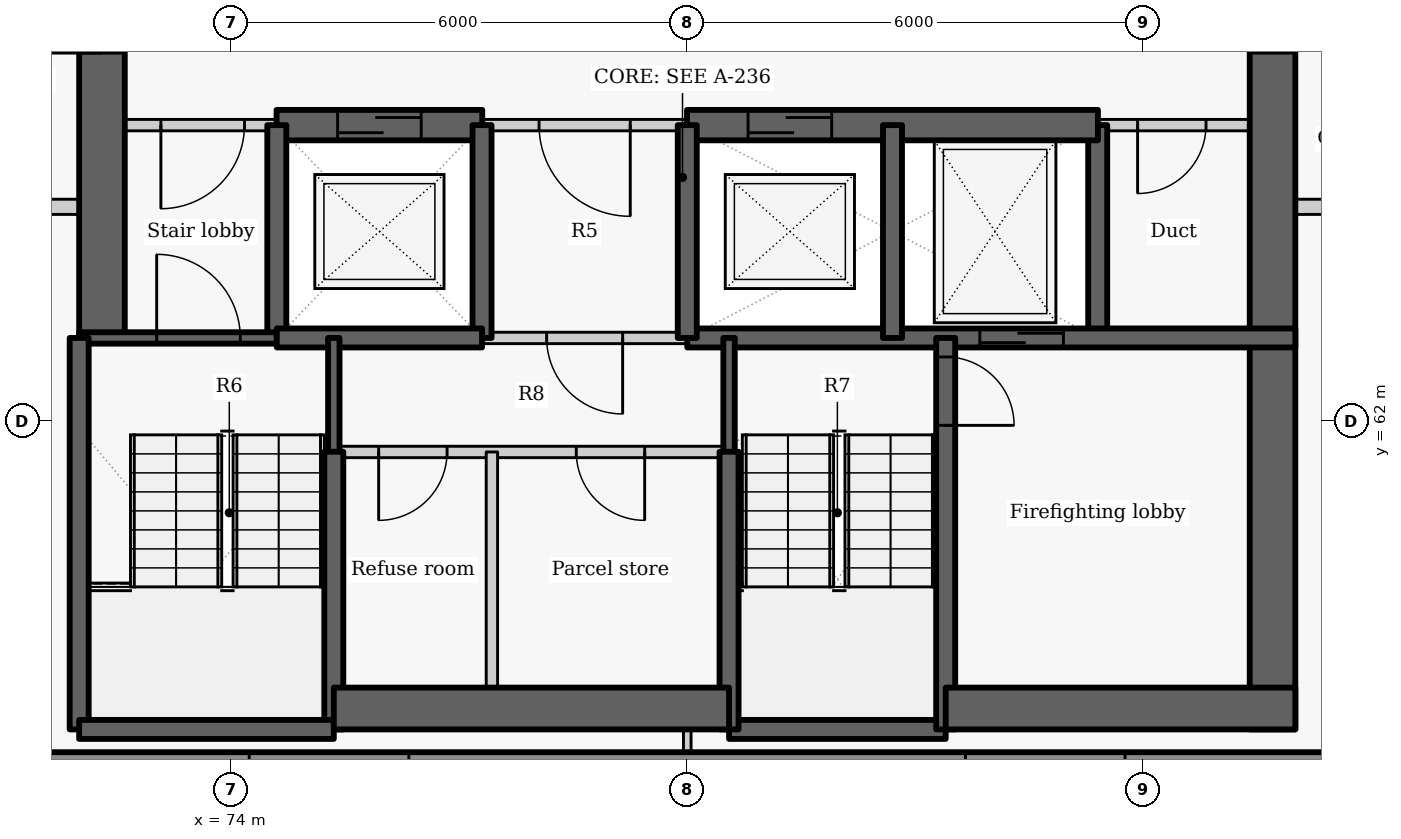
"""IFC4 building model, lengths in metres.
Left out: names, types, materials, properties, quantities, classifications, styles, units other than length and angle.
Written with IfcOpenShell. Run it as: python <this file> out.ifc"""

import sys

from ifc_helpers import new_model, si_unit, direction, frame, frame_2d, origin, place, context, subcontext, project, spatial, rectangle, extrude, element, fill, save


model = new_model("IFC4")
c1 = context("Model", 3, precision=1e-05, world=origin(), true_north=direction((0.0, 1.0)))
c2 = subcontext(c1, "Body", "Model", "MODEL_VIEW")
j1 = project(units=[si_unit("LENGTHUNIT", "METRE"), si_unit("PLANEANGLEUNIT", "RADIAN")], contexts=[c1])
p1 = place(None, origin())
s1 = spatial("IfcSite", under=j1, at=p1, CompositionType="ELEMENT")
p2 = place(p1, origin())
s2 = spatial("IfcBuilding", under=s1, at=p2, CompositionType="ELEMENT")
p3 = place(p2, frame((0.0, 0.0, 213.0)))
s3 = spatial("IfcBuildingStorey", under=s2, at=p3, CompositionType="ELEMENT", Elevation=213.0)
p4 = place(p3, frame((70.551, 57.5, 0.0), z_axis=(0.0, 0.0, 1.0), x_axis=(1.0, 0.0, 0.0)))
e1 = element("IfcWall", 1, at=p4, inside=s3, PredefinedType="SOLIDWALL", context=c2, shape_type="SweptSolid", body=[
    extrude(rectangle(XDim=18.893, YDim=0.3, at=frame_2d((9.446, 0.0))), origin(), (0.0, 0.0, 1.0), 2.425),
])
p5 = place(p4, frame((3.687, 0.0, 0.9)))
e2 = element("IfcOpeningElement", 2, at=p5, cuts=e1, PredefinedType="OPENING", context=c2, shape_type="SweptSolid", body=[
    extrude(rectangle(XDim=2.1, YDim=1.1, at=frame_2d((1.05, 0.55))), frame((0.0, 0.16, 0.0), z_axis=(0.0, -1.0, 0.0), x_axis=(1.0, 0.0, 0.0)), (0.0, 0.0, 1.0), 0.32),
])
p6 = place(p4, frame((13.109, 0.0, 0.9)))
e3 = element("IfcOpeningElement", 3, at=p6, cuts=e1, PredefinedType="OPENING", context=c2, shape_type="SweptSolid", body=[
    extrude(rectangle(XDim=2.1, YDim=1.1, at=frame_2d((1.05, 0.55))), frame((0.0, 0.16, 0.0), z_axis=(0.0, -1.0, 0.0), x_axis=(1.0, 0.0, 0.0)), (0.0, 0.0, 1.0), 0.32),
])
p7 = place(p3, frame((72.3, 63.1, -0.275), z_axis=(0.0, 0.0, 1.0), x_axis=(0.0, 1.0, 0.0)))
e4 = element("IfcWall", 4, at=p7, inside=s3, PredefinedType="SHEAR", context=c2, shape_type="SweptSolid", body=[
    extrude(rectangle(XDim=9.1, YDim=0.6, at=frame_2d((4.55, 0.0))), origin(), (0.0, 0.0, 1.0), 3.3),
])
p8 = place(p7, frame((3.748, 0.0, 0.275)))
e5 = element("IfcOpeningElement", 5, at=p8, cuts=e4, PredefinedType="OPENING", context=c2, shape_type="SweptSolid", body=[
    extrude(rectangle(XDim=1.5, YDim=2.1, at=frame_2d((0.75, 1.05))), frame((0.0, 0.31, 0.0), z_axis=(0.0, -1.0, 0.0), x_axis=(1.0, 0.0, 0.0)), (0.0, 0.0, 1.0), 0.62),
])
p9 = place(p3, frame((85.4, 63.1, -0.275), z_axis=(0.0, 0.0, 1.0), x_axis=(0.0, 1.0, 0.0)))
e6 = element("IfcWall", 6, at=p9, inside=s3, PredefinedType="SHEAR", context=c2, shape_type="SweptSolid", body=[
    extrude(rectangle(XDim=2.8, YDim=0.25, at=frame_2d((1.4, 0.0))), origin(), (0.0, 0.0, 1.0), 3.3),
])
p10 = place(p3, frame((87.7, 72.2, -0.275), z_axis=(0.0, 0.0, 1.0), x_axis=(0.0, -1.0, 0.0)))
e7 = element("IfcWall", 7, at=p10, inside=s3, PredefinedType="SHEAR", context=c2, shape_type="SweptSolid", body=[
    extrude(rectangle(XDim=14.25, YDim=0.6, at=frame_2d((7.125, 0.0))), origin(), (0.0, 0.0, 1.0), 3.3),
])
p11 = place(p10, frame((3.852, 0.0, 0.275)))
e8 = element("IfcOpeningElement", 8, at=p11, cuts=e7, PredefinedType="OPENING", context=c2, shape_type="SweptSolid", body=[
    extrude(rectangle(XDim=1.5, YDim=2.1, at=frame_2d((0.75, 1.05))), frame((0.0, 0.31, 0.0), z_axis=(0.0, -1.0, 0.0), x_axis=(1.0, 0.0, 0.0)), (0.0, 0.0, 1.0), 0.62),
])
p12 = place(p3, frame((74.603, 65.9, 0.0), z_axis=(0.0, 0.0, 1.0), x_axis=(-1.0, 0.0, 0.0)))
e9 = element("IfcWall", 9, at=p12, inside=s3, PredefinedType="PARTITIONING", context=c2, shape_type="SweptSolid", body=[
    extrude(rectangle(XDim=2.603, YDim=0.15, at=frame_2d((1.302, 0.0))), origin(), (0.0, 0.0, 1.0), 3.025),
])
p13 = place(p12, frame((0.428, 0.0, 0.0)))
e10 = element("IfcOpeningElement", 10, at=p13, cuts=e9, PredefinedType="OPENING", context=c2, shape_type="SweptSolid", body=[
    extrude(rectangle(XDim=1.1, YDim=2.1, at=frame_2d((0.55, 1.05))), frame((0.0, 0.085, 0.0), z_axis=(0.0, -1.0, 0.0), x_axis=(1.0, 0.0, 0.0)), (0.0, 0.0, 1.0), 0.17),
])
p14 = place(p3, frame((80.003, 65.9, 0.0), z_axis=(0.0, 0.0, 1.0), x_axis=(-1.0, 0.0, 0.0)))
e11 = element("IfcWall", 11, at=p14, inside=s3, PredefinedType="PARTITIONING", context=c2, shape_type="SweptSolid", body=[
    extrude(rectangle(XDim=2.706, YDim=0.15, at=frame_2d((1.353, 0.0))), origin(), (0.0, 0.0, 1.0), 3.025),
])
p15 = place(p14, frame((0.753, 0.0, 0.0)))
e12 = element("IfcOpeningElement", 12, at=p15, cuts=e11, PredefinedType="OPENING", context=c2, shape_type="SweptSolid", body=[
    extrude(rectangle(XDim=1.2, YDim=2.1, at=frame_2d((0.6, 1.05))), frame((0.0, 0.085, 0.0), z_axis=(0.0, -1.0, 0.0), x_axis=(1.0, 0.0, 0.0)), (0.0, 0.0, 1.0), 0.17),
])
p16 = place(p3, frame((88.0, 65.9, 0.0), z_axis=(0.0, 0.0, 1.0), x_axis=(-1.0, 0.0, 0.0)))
e13 = element("IfcWall", 13, at=p16, inside=s3, PredefinedType="PARTITIONING", context=c2, shape_type="SweptSolid", body=[
    extrude(rectangle(XDim=2.603, YDim=0.15, at=frame_2d((1.302, 0.0))), origin(), (0.0, 0.0, 1.0), 3.025),
])
p17 = place(p16, frame((1.175, 0.0, 0.0)))
e14 = element("IfcOpeningElement", 14, at=p17, cuts=e13, PredefinedType="OPENING", context=c2, shape_type="SweptSolid", body=[
    extrude(rectangle(XDim=0.9, YDim=2.1, at=frame_2d((0.45, 1.05))), frame((0.0, 0.085, 0.0), z_axis=(0.0, -1.0, 0.0), x_axis=(1.0, 0.0, 0.0)), (0.0, 0.0, 1.0), 0.17),
])
p18 = place(p3, frame((74.597, 65.9, -0.275), z_axis=(0.0, 0.0, 1.0), x_axis=(1.0, 0.0, 0.0)))
e15 = element("IfcWall", 15, at=p18, inside=s3, PredefinedType="SHEAR", context=c2, shape_type="SweptSolid", body=[
    extrude(rectangle(XDim=2.706, YDim=0.4, at=frame_2d((1.353, 0.0))), origin(), (0.0, 0.0, 1.0), 3.3),
])
p19 = place(p18, frame((0.803, 0.0, 0.275)))
e16 = element("IfcOpeningElement", 16, at=p19, cuts=e15, PredefinedType="OPENING", context=c2, shape_type="SweptSolid", body=[
    extrude(rectangle(XDim=1.1, YDim=2.1, at=frame_2d((0.55, 1.05))), frame((0.0, 0.21, 0.0), z_axis=(0.0, -1.0, 0.0), x_axis=(1.0, 0.0, 0.0)), (0.0, 0.0, 1.0), 0.42),
])
p20 = place(p3, frame((79.997, 65.9, -0.275), z_axis=(0.0, 0.0, 1.0), x_axis=(1.0, 0.0, 0.0)))
e17 = element("IfcWall", 17, at=p20, inside=s3, PredefinedType="SHEAR", context=c2, shape_type="SweptSolid", body=[
    extrude(rectangle(XDim=5.406, YDim=0.4, at=frame_2d((2.703, 0.0))), origin(), (0.0, 0.0, 1.0), 3.3),
])
p21 = place(p20, frame((0.803, 0.0, 0.275)))
e18 = element("IfcOpeningElement", 18, at=p21, cuts=e17, PredefinedType="OPENING", context=c2, shape_type="SweptSolid", body=[
    extrude(rectangle(XDim=1.1, YDim=2.1, at=frame_2d((0.55, 1.05))), frame((0.0, 0.21, 0.0), z_axis=(0.0, -1.0, 0.0), x_axis=(1.0, 0.0, 0.0)), (0.0, 0.0, 1.0), 0.42),
])
p22 = place(p3, frame((74.6, 63.1, -0.275), z_axis=(0.0, 0.0, 1.0), x_axis=(0.0, 1.0, 0.0)))
e19 = element("IfcWall", 19, at=p22, inside=s3, PredefinedType="SHEAR", context=c2, shape_type="SweptSolid", body=[
    extrude(rectangle(XDim=2.8, YDim=0.25, at=frame_2d((1.4, 0.0))), origin(), (0.0, 0.0, 1.0), 3.3),
])
p23 = place(p3, frame((72.0, 63.1, -0.275), z_axis=(0.0, 0.0, 1.0), x_axis=(1.0, 0.0, 0.0)))
e20 = element("IfcWall", 20, at=p23, inside=s3, PredefinedType="SHEAR", context=c2, shape_type="SweptSolid", body=[
    extrude(rectangle(XDim=2.6, YDim=0.15, at=frame_2d((1.3, 0.0))), origin(), (0.0, 0.0, 1.0), 3.3),
])
p24 = place(p23, frame((1.02, 0.0, 0.275)))
e21 = element("IfcOpeningElement", 21, at=p24, cuts=e20, PredefinedType="OPENING", context=c2, shape_type="SweptSolid", body=[
    extrude(rectangle(XDim=1.1, YDim=2.1, at=frame_2d((0.55, 1.05))), frame((0.0, 0.085, 0.0), z_axis=(0.0, -1.0, 0.0), x_axis=(1.0, 0.0, 0.0)), (0.0, 0.0, 1.0), 0.17),
])
p25 = place(p3, frame((77.3, 63.1, -0.275), z_axis=(0.0, 0.0, 1.0), x_axis=(0.0, 1.0, 0.0)))
e22 = element("IfcWall", 22, at=p25, inside=s3, PredefinedType="SHEAR", context=c2, shape_type="SweptSolid", body=[
    extrude(rectangle(XDim=2.8, YDim=0.25, at=frame_2d((1.4, 0.0))), origin(), (0.0, 0.0, 1.0), 3.3),
])
p26 = place(p3, frame((74.6, 63.1, -0.275), z_axis=(0.0, 0.0, 1.0), x_axis=(1.0, 0.0, 0.0)))
e23 = element("IfcWall", 23, at=p26, inside=s3, PredefinedType="SHEAR", context=c2, shape_type="SweptSolid", body=[
    extrude(rectangle(XDim=2.7, YDim=0.25, at=frame_2d((1.35, 0.0))), origin(), (0.0, 0.0, 1.0), 3.3),
])
p27 = place(p3, frame((80.0, 63.1, -0.275), z_axis=(0.0, 0.0, 1.0), x_axis=(1.0, 0.0, 0.0)))
e24 = element("IfcWall", 24, at=p27, inside=s3, PredefinedType="SHEAR", context=c2, shape_type="SweptSolid", body=[
    extrude(rectangle(XDim=8.0, YDim=0.25, at=frame_2d((4.0, 0.0))), origin(), (0.0, 0.0, 1.0), 3.3),
])
p28 = place(p27, frame((3.849, 0.0, 0.275)))
e25 = element("IfcOpeningElement", 25, at=p28, cuts=e24, PredefinedType="OPENING", context=c2, shape_type="SweptSolid", body=[
    extrude(rectangle(XDim=1.1, YDim=2.1, at=frame_2d((0.55, 1.05))), frame((0.0, 0.135, 0.0), z_axis=(0.0, -1.0, 0.0), x_axis=(1.0, 0.0, 0.0)), (0.0, 0.0, 1.0), 0.27),
])
p29 = place(p3, frame((80.0, 63.1, -0.275), z_axis=(0.0, 0.0, 1.0), x_axis=(0.0, 1.0, 0.0)))
e26 = element("IfcWall", 26, at=p29, inside=s3, PredefinedType="SHEAR", context=c2, shape_type="SweptSolid", body=[
    extrude(rectangle(XDim=2.8, YDim=0.25, at=frame_2d((1.4, 0.0))), origin(), (0.0, 0.0, 1.0), 3.3),
])
p30 = place(p3, frame((80.0, 63.1, 0.0), z_axis=(0.0, 0.0, 1.0), x_axis=(-1.0, 0.0, 0.0)))
e27 = element("IfcWall", 27, at=p30, inside=s3, PredefinedType="PARTITIONING", context=c2, shape_type="SweptSolid", body=[
    extrude(rectangle(XDim=2.7, YDim=0.15, at=frame_2d((1.35, 0.0))), origin(), (0.0, 0.0, 1.0), 3.025),
])
p31 = place(p30, frame((0.85, 0.0, 0.0)))
e28 = element("IfcOpeningElement", 28, at=p31, cuts=e27, PredefinedType="OPENING", context=c2, shape_type="SweptSolid", body=[
    extrude(rectangle(XDim=1.0, YDim=2.1, at=frame_2d((0.5, 1.05))), frame((0.0, 0.085, 0.0), z_axis=(0.0, -1.0, 0.0), x_axis=(1.0, 0.0, 0.0)), (0.0, 0.0, 1.0), 0.17),
])
p32 = place(p3, frame((82.7, 63.1, -0.275), z_axis=(0.0, 0.0, 1.0), x_axis=(0.0, 1.0, 0.0)))
e29 = element("IfcWall", 29, at=p32, inside=s3, PredefinedType="SHEAR", context=c2, shape_type="SweptSolid", body=[
    extrude(rectangle(XDim=2.8, YDim=0.25, at=frame_2d((1.4, 0.0))), origin(), (0.0, 0.0, 1.0), 3.3),
])
p33 = place(p3, frame((75.35, 61.597, -0.275), z_axis=(0.0, 0.0, 1.0), x_axis=(0.0, 1.0, 0.0)))
e30 = element("IfcWall", 30, at=p33, inside=s3, PredefinedType="SHEAR", context=c2, shape_type="SweptSolid", body=[
    extrude(rectangle(XDim=1.503, YDim=0.15, at=frame_2d((0.751, 0.0))), origin(), (0.0, 0.0, 1.0), 3.3),
])
p34 = place(p3, frame((75.35, 57.95, -0.275), z_axis=(0.0, 0.0, 1.0), x_axis=(0.0, 1.0, 0.0)))
e31 = element("IfcWall", 31, at=p34, inside=s3, PredefinedType="SHEAR", context=c2, shape_type="SweptSolid", body=[
    extrude(rectangle(XDim=3.653, YDim=0.25, at=frame_2d((1.827, 0.0))), origin(), (0.0, 0.0, 1.0), 3.3),
])
p35 = place(p3, frame((72.0, 57.95, -0.275), z_axis=(0.0, 0.0, 1.0), x_axis=(0.0, 1.0, 0.0)))
e32 = element("IfcWall", 32, at=p35, inside=s3, PredefinedType="SHEAR", context=c2, shape_type="SweptSolid", body=[
    extrude(rectangle(XDim=5.15, YDim=0.25, at=frame_2d((2.575, 0.0))), origin(), (0.0, 0.0, 1.0), 3.3),
])
p36 = place(p3, frame((72.0, 57.95, -0.275), z_axis=(0.0, 0.0, 1.0), x_axis=(1.0, 0.0, 0.0)))
e33 = element("IfcWall", 33, at=p36, inside=s3, PredefinedType="SHEAR", context=c2, shape_type="SweptSolid", body=[
    extrude(rectangle(XDim=3.35, YDim=0.25, at=frame_2d((1.675, 0.0))), origin(), (0.0, 0.0, 1.0), 3.3),
])
p37 = place(p3, frame((80.55, 57.95, -0.275), z_axis=(0.0, 0.0, 1.0), x_axis=(1.0, 0.0, 0.0)))
e34 = element("IfcWall", 34, at=p37, inside=s3, PredefinedType="SHEAR", context=c2, shape_type="SweptSolid", body=[
    extrude(rectangle(XDim=2.85, YDim=0.25, at=frame_2d((1.425, 0.0))), origin(), (0.0, 0.0, 1.0), 3.3),
])
p38 = place(p3, frame((83.4, 63.1, -0.275), z_axis=(0.0, 0.0, 1.0), x_axis=(0.0, -1.0, 0.0)))
e35 = element("IfcWall", 35, at=p38, inside=s3, PredefinedType="SHEAR", context=c2, shape_type="SweptSolid", body=[
    extrude(rectangle(XDim=5.15, YDim=0.25, at=frame_2d((2.575, 0.0))), origin(), (0.0, 0.0, 1.0), 3.3),
])
p39 = place(p38, frame((0.25, 0.0, 0.275)))
e36 = element("IfcOpeningElement", 36, at=p39, cuts=e35, PredefinedType="OPENING", context=c2, shape_type="SweptSolid", body=[
    extrude(rectangle(XDim=0.9, YDim=2.1, at=frame_2d((0.45, 1.05))), frame((0.0, 0.135, 0.0), z_axis=(0.0, -1.0, 0.0), x_axis=(1.0, 0.0, 0.0)), (0.0, 0.0, 1.0), 0.27),
])
p40 = place(p3, frame((80.55, 61.597, -0.275), z_axis=(0.0, 0.0, 1.0), x_axis=(0.0, 1.0, 0.0)))
e37 = element("IfcWall", 37, at=p40, inside=s3, PredefinedType="SHEAR", context=c2, shape_type="SweptSolid", body=[
    extrude(rectangle(XDim=1.503, YDim=0.15, at=frame_2d((0.751, 0.0))), origin(), (0.0, 0.0, 1.0), 3.3),
])
p41 = place(p3, frame((80.55, 57.95, -0.275), z_axis=(0.0, 0.0, 1.0), x_axis=(0.0, 1.0, 0.0)))
e38 = element("IfcWall", 38, at=p41, inside=s3, PredefinedType="SHEAR", context=c2, shape_type="SweptSolid", body=[
    extrude(rectangle(XDim=3.653, YDim=0.25, at=frame_2d((1.827, 0.0))), origin(), (0.0, 0.0, 1.0), 3.3),
])
p42 = place(p3, frame((75.35, 58.225, -0.275), z_axis=(0.0, 0.0, 1.0), x_axis=(1.0, 0.0, 0.0)))
e39 = element("IfcWall", 39, at=p42, inside=s3, PredefinedType="SHEAR", context=c2, shape_type="SweptSolid", body=[
    extrude(rectangle(XDim=5.2, YDim=0.55, at=frame_2d((2.6, 0.0))), origin(), (0.0, 0.0, 1.0), 3.3),
])
p43 = place(p3, frame((83.4, 58.225, -0.275), z_axis=(0.0, 0.0, 1.0), x_axis=(1.0, 0.0, 0.0)))
e40 = element("IfcWall", 40, at=p43, inside=s3, PredefinedType="SHEAR", context=c2, shape_type="SweptSolid", body=[
    extrude(rectangle(XDim=4.6, YDim=0.55, at=frame_2d((2.3, 0.0))), origin(), (0.0, 0.0, 1.0), 3.3),
])
p44 = place(p3, frame((80.55, 61.6, 0.0), z_axis=(0.0, 0.0, 1.0), x_axis=(-1.0, 0.0, 0.0)))
e41 = element("IfcWall", 41, at=p44, inside=s3, PredefinedType="PARTITIONING", context=c2, shape_type="SweptSolid", body=[
    extrude(rectangle(XDim=5.2, YDim=0.15, at=frame_2d((2.6, 0.0))), origin(), (0.0, 0.0, 1.0), 3.025),
])
p45 = place(p44, frame((3.71, 0.0, 0.0)))
e42 = element("IfcOpeningElement", 42, at=p45, cuts=e41, PredefinedType="OPENING", context=c2, shape_type="SweptSolid", body=[
    extrude(rectangle(XDim=0.9, YDim=2.1, at=frame_2d((0.45, 1.05))), frame((0.0, 0.085, 0.0), z_axis=(0.0, -1.0, 0.0), x_axis=(1.0, 0.0, 0.0)), (0.0, 0.0, 1.0), 0.17),
])
p46 = place(p44, frame((1.11, 0.0, 0.0)))
e43 = element("IfcOpeningElement", 43, at=p46, cuts=e41, PredefinedType="OPENING", context=c2, shape_type="SweptSolid", body=[
    extrude(rectangle(XDim=0.9, YDim=2.1, at=frame_2d((0.45, 1.05))), frame((0.0, 0.085, 0.0), z_axis=(0.0, -1.0, 0.0), x_axis=(1.0, 0.0, 0.0)), (0.0, 0.0, 1.0), 0.17),
])
p47 = place(p3, frame((77.43, 57.95, 0.0), z_axis=(0.0, 0.0, 1.0), x_axis=(0.0, 1.0, 0.0)))
e44 = element("IfcWall", 44, at=p47, inside=s3, PredefinedType="PARTITIONING", context=c2, shape_type="SweptSolid", body=[
    extrude(rectangle(XDim=3.65, YDim=0.15, at=frame_2d((1.825, 0.0))), origin(), (0.0, 0.0, 1.0), 3.025),
])
p48 = place(p3, frame((70.527, 64.825, 0.0), z_axis=(0.0, 0.0, 1.0), x_axis=(1.0, 0.0, 0.0)))
e45 = element("IfcWall", 45, at=p48, inside=s3, PredefinedType="PARTITIONING", context=c2, shape_type="SweptSolid", body=[
    extrude(rectangle(XDim=1.473, YDim=0.2, at=frame_2d((0.736, 0.0))), origin(), (0.0, 0.0, 1.0), 3.025),
])
p49 = place(p3, frame((88.0, 64.825, 0.0), z_axis=(0.0, 0.0, 1.0), x_axis=(1.0, 0.0, 0.0)))
e46 = element("IfcWall", 46, at=p49, inside=s3, PredefinedType="PARTITIONING", context=c2, shape_type="SweptSolid", body=[
    extrude(rectangle(XDim=2.413, YDim=0.2, at=frame_2d((1.207, 0.0))), origin(), (0.0, 0.0, 1.0), 2.505),
])
p50 = place(p3, frame((80.0, 57.65, 0.0), z_axis=(0.0, 0.0, 1.0), x_axis=(0.0, 1.0, 0.0)))
e47 = element("IfcWall", 47, at=p50, inside=s3, PredefinedType="PARTITIONING", context=c2, shape_type="SweptSolid", body=[
    extrude(rectangle(XDim=0.3, YDim=0.1, at=frame_2d((0.15, 0.0))), origin(), (0.0, 0.0, 1.0), 3.025),
])
p51 = place(p13, origin())
e48 = element("IfcDoor", 48, at=p51, inside=s3, OperationType="SINGLE_SWING_RIGHT", PredefinedType="DOOR", context=c2, shape_type="SweptSolid", body=[
    extrude(rectangle(XDim=1.1, YDim=2.1, at=frame_2d((0.55, 1.05))), frame((0.0, 0.025, 0.0), z_axis=(0.0, -1.0, 0.0), x_axis=(1.0, 0.0, 0.0)), (0.0, 0.0, 1.0), 0.05),
])
fill(e10, e48)
p52 = place(p19, origin())
e49 = element("IfcDoor", 49, at=p52, inside=s3, OperationType="SLIDING_TO_LEFT", PredefinedType="DOOR", context=c2, shape_type="SweptSolid", body=[
    extrude(rectangle(XDim=1.1, YDim=2.1, at=frame_2d((0.55, 1.05))), frame((0.0, 0.025, 0.0), z_axis=(0.0, -1.0, 0.0), x_axis=(1.0, 0.0, 0.0)), (0.0, 0.0, 1.0), 0.05),
])
fill(e16, e49)
p53 = place(p15, origin())
e50 = element("IfcDoor", 50, at=p53, inside=s3, OperationType="DOUBLE_DOOR_SINGLE_SWING", PredefinedType="DOOR", context=c2, shape_type="SweptSolid", body=[
    extrude(rectangle(XDim=1.2, YDim=2.1, at=frame_2d((0.6, 1.05))), frame((0.0, 0.025, 0.0), z_axis=(0.0, -1.0, 0.0), x_axis=(1.0, 0.0, 0.0)), (0.0, 0.0, 1.0), 0.05),
])
fill(e12, e50)
p54 = place(p21, origin())
e51 = element("IfcDoor", 51, at=p54, inside=s3, OperationType="SLIDING_TO_LEFT", PredefinedType="DOOR", context=c2, shape_type="SweptSolid", body=[
    extrude(rectangle(XDim=1.1, YDim=2.1, at=frame_2d((0.55, 1.05))), frame((0.0, 0.025, 0.0), z_axis=(0.0, -1.0, 0.0), x_axis=(1.0, 0.0, 0.0)), (0.0, 0.0, 1.0), 0.05),
])
fill(e18, e51)
p55 = place(p28, origin())
e52 = element("IfcDoor", 52, at=p55, inside=s3, OperationType="SLIDING_TO_LEFT", PredefinedType="DOOR", context=c2, shape_type="SweptSolid", body=[
    extrude(rectangle(XDim=1.1, YDim=2.1, at=frame_2d((0.55, 1.05))), frame((0.0, 0.025, 0.0), z_axis=(0.0, -1.0, 0.0), x_axis=(1.0, 0.0, 0.0)), (0.0, 0.0, 1.0), 0.05),
])
fill(e25, e52)
p56 = place(p17, origin())
e53 = element("IfcDoor", 53, at=p56, inside=s3, OperationType="SINGLE_SWING_RIGHT", PredefinedType="DOOR", context=c2, shape_type="SweptSolid", body=[
    extrude(rectangle(XDim=0.9, YDim=2.1, at=frame_2d((0.45, 1.05))), frame((0.0, 0.025, 0.0), z_axis=(0.0, -1.0, 0.0), x_axis=(1.0, 0.0, 0.0)), (0.0, 0.0, 1.0), 0.05),
])
fill(e14, e53)
p57 = place(p31, origin())
e54 = element("IfcDoor", 54, at=p57, inside=s3, OperationType="SINGLE_SWING_LEFT", PredefinedType="DOOR", context=c2, shape_type="SweptSolid", body=[
    extrude(rectangle(XDim=1.0, YDim=2.1, at=frame_2d((0.5, 1.05))), frame((0.0, 0.025, 0.0), z_axis=(0.0, -1.0, 0.0), x_axis=(1.0, 0.0, 0.0)), (0.0, 0.0, 1.0), 0.05),
])
fill(e28, e54)
p58 = place(p45, origin())
e55 = element("IfcDoor", 55, at=p58, inside=s3, OperationType="SINGLE_SWING_RIGHT", PredefinedType="DOOR", context=c2, shape_type="SweptSolid", body=[
    extrude(rectangle(XDim=0.9, YDim=2.1, at=frame_2d((0.45, 1.05))), frame((0.0, 0.025, 0.0), z_axis=(0.0, -1.0, 0.0), x_axis=(1.0, 0.0, 0.0)), (0.0, 0.0, 1.0), 0.05),
])
fill(e42, e55)
p59 = place(p46, origin())
e56 = element("IfcDoor", 56, at=p59, inside=s3, OperationType="SINGLE_SWING_LEFT", PredefinedType="DOOR", context=c2, shape_type="SweptSolid", body=[
    extrude(rectangle(XDim=0.9, YDim=2.1, at=frame_2d((0.45, 1.05))), frame((0.0, 0.025, 0.0), z_axis=(0.0, -1.0, 0.0), x_axis=(1.0, 0.0, 0.0)), (0.0, 0.0, 1.0), 0.05),
])
fill(e43, e56)
p60 = place(p24, origin())
e57 = element("IfcDoor", 57, at=p60, inside=s3, OperationType="SINGLE_SWING_LEFT", PredefinedType="DOOR", context=c2, shape_type="SweptSolid", body=[
    extrude(rectangle(XDim=1.1, YDim=2.1, at=frame_2d((0.55, 1.05))), frame((0.0, 0.025, 0.0), z_axis=(0.0, -1.0, 0.0), x_axis=(1.0, 0.0, 0.0)), (0.0, 0.0, 1.0), 0.05),
])
fill(e21, e57)
p61 = place(p39, origin())
e58 = element("IfcDoor", 58, at=p61, inside=s3, OperationType="SINGLE_SWING_RIGHT", PredefinedType="DOOR", context=c2, shape_type="SweptSolid", body=[
    extrude(rectangle(XDim=0.9, YDim=2.1, at=frame_2d((0.45, 1.05))), frame((0.0, 0.025, 0.0), z_axis=(0.0, -1.0, 0.0), x_axis=(1.0, 0.0, 0.0)), (0.0, 0.0, 1.0), 0.05),
])
fill(e36, e58)
p62 = place(p11, origin())
e59 = element("IfcDoor", 59, at=p62, inside=s3, OperationType="DOUBLE_DOOR_SINGLE_SWING", PredefinedType="DOOR", context=c2, shape_type="SweptSolid", body=[
    extrude(rectangle(XDim=1.5, YDim=2.1, at=frame_2d((0.75, 1.05))), frame((0.0, 0.025, 0.0), z_axis=(0.0, -1.0, 0.0), x_axis=(1.0, 0.0, 0.0)), (0.0, 0.0, 1.0), 0.05),
])
fill(e8, e59)
p63 = place(p8, origin())
e60 = element("IfcDoor", 60, at=p63, inside=s3, OperationType="DOUBLE_DOOR_SINGLE_SWING", PredefinedType="DOOR", context=c2, shape_type="SweptSolid", body=[
    extrude(rectangle(XDim=1.5, YDim=2.1, at=frame_2d((0.75, 1.05))), frame((0.0, 0.025, 0.0), z_axis=(0.0, -1.0, 0.0), x_axis=(1.0, 0.0, 0.0)), (0.0, 0.0, 1.0), 0.05),
])
fill(e5, e60)
save(model, sys.argv[1])
